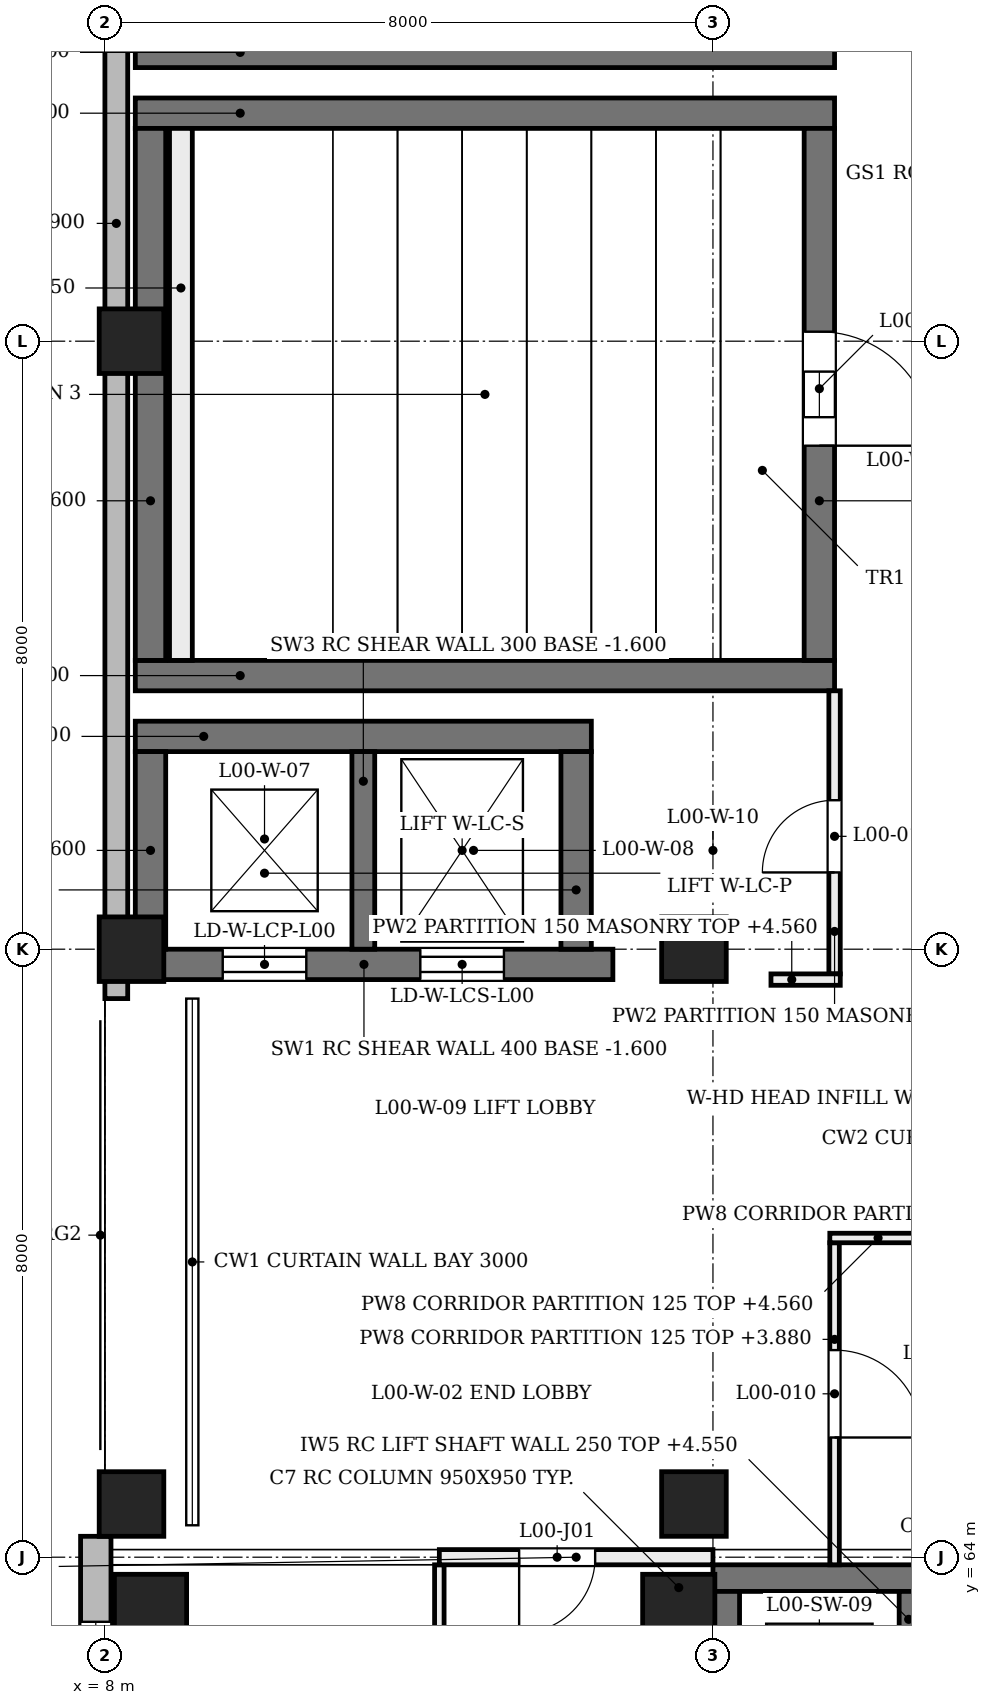
"""IFC4 building model, lengths in metres.
Left out: names, types, materials, properties, quantities, classifications, styles, units other than length and angle.
Written with IfcOpenShell. Run it as: python <this file> out.ifc"""

import sys

from ifc_helpers import new_model, si_unit, direction, frame, frame_2d, origin, origin_2d, place, context, subcontext, project, spatial, rectangle, extrude, element, fill, save


model = new_model("IFC4")
c1 = context("Model", 3, precision=1e-05, world=origin(), true_north=direction((0.0, 1.0)))
c2 = subcontext(c1, "Body", "Model", "MODEL_VIEW")
j1 = project(units=[si_unit("LENGTHUNIT", "METRE"), si_unit("PLANEANGLEUNIT", "RADIAN")], contexts=[c1])
p1 = place(None, origin())
s1 = spatial("IfcSite", under=j1, at=p1, CompositionType="ELEMENT")
p2 = place(p1, origin())
s2 = spatial("IfcBuilding", under=s1, at=p2, CompositionType="ELEMENT")
p3 = place(p2, origin())
s3 = spatial("IfcBuildingStorey", under=s2, at=p3, CompositionType="ELEMENT", Elevation=0.0)
for number, where, z_axis, x_axis in (
    (1, (8.4, 75.6, -1.6), (0.0, 0.0, 1.0), (1.0, 0.0, 0.0)),
    (2, (8.4, 83.0, -1.6), (0.0, 0.0, 1.0), (1.0, 0.0, 0.0)),
):
    element("IfcWall", number, at=place(p3, frame(where, z_axis=z_axis, x_axis=x_axis)), inside=s3, PredefinedType="SHEAR", context=c2, shape_type="SweptSolid", body=[
        extrude(rectangle(XDim=9.2, YDim=0.4, at=frame_2d((4.6, 0.0))), origin(), (0.0, 0.0, 1.0), 6.18),
    ])
p4 = place(p3, frame((8.6, 75.8, -1.6), z_axis=(0.0, 0.0, 1.0), x_axis=(0.0, 1.0, 0.0)))
e3 = element("IfcWall", 3, at=p4, inside=s3, PredefinedType="SHEAR", context=c2, shape_type="SweptSolid", body=[
    extrude(rectangle(XDim=7.0, YDim=0.4, at=frame_2d((3.5, 0.0))), origin(), (0.0, 0.0, 1.0), 6.18),
])
p5 = place(p3, frame((17.4, 75.8, -1.6), z_axis=(0.0, 0.0, 1.0), x_axis=(0.0, 1.0, 0.0)))
e4 = element("IfcWall", 4, at=p5, inside=s3, PredefinedType="SHEAR", context=c2, shape_type="SweptSolid", body=[
    extrude(rectangle(XDim=7.0, YDim=0.4, at=frame_2d((3.5, 0.0))), origin(), (0.0, 0.0, 1.0), 6.18),
])
p6 = place(p5, frame((2.825, 0.0, 1.6)))
e5 = element("IfcOpeningElement", 5, at=p6, cuts=e4, PredefinedType="OPENING", context=c2, shape_type="SweptSolid", body=[
    extrude(rectangle(XDim=1.5, YDim=2.1, at=frame_2d((0.75, 1.05))), frame((0.0, 0.21, 0.0), z_axis=(0.0, -1.0, 0.0), x_axis=(1.0, 0.0, 0.0)), (0.0, 0.0, 1.0), 0.42),
])
p7 = place(p5, frame((3.2, 0.0, 5.32)))
e6 = element("IfcOpeningElement", 6, at=p7, cuts=e4, PredefinedType="OPENING", context=c2, shape_type="SweptSolid", body=[
    extrude(rectangle(XDim=0.6, YDim=0.5, at=frame_2d((0.3, 0.25))), frame((0.0, 0.21, 0.0), z_axis=(0.0, -1.0, 0.0), x_axis=(1.0, 0.0, 0.0)), (0.0, 0.0, 1.0), 0.42),
])
p8 = place(p3, frame((8.4, 83.8, -1.6), z_axis=(0.0, 0.0, 1.0), x_axis=(1.0, 0.0, 0.0)))
e7 = element("IfcWall", 7, at=p8, inside=s3, PredefinedType="SHEAR", context=c2, shape_type="SweptSolid", body=[
    extrude(rectangle(XDim=9.2, YDim=0.4, at=frame_2d((4.6, 0.0))), origin(), (0.0, 0.0, 1.0), 6.18),
])
p9 = place(p3, frame((8.133, 71.8, -1.6), z_axis=(0.0, 0.0, 1.0), x_axis=(1.0, 0.0, 0.0)))
e8 = element("IfcWall", 8, at=p9, inside=s3, PredefinedType="SHEAR", context=c2, shape_type="SweptSolid", body=[
    extrude(rectangle(XDim=6.55, YDim=0.4, at=frame_2d((3.275, 0.0))), origin(), (0.0, 0.0, 1.0), 6.18),
])
p10 = place(p9, frame((1.417, 0.0, 1.6)))
e9 = element("IfcOpeningElement", 9, at=p10, cuts=e8, PredefinedType="OPENING", context=c2, shape_type="SweptSolid", body=[
    extrude(rectangle(XDim=1.1, YDim=2.1, at=frame_2d((0.55, 1.05))), frame((0.0, 0.21, 0.0), z_axis=(0.0, -1.0, 0.0), x_axis=(1.0, 0.0, 0.0)), (0.0, 0.0, 1.0), 0.42),
])
p11 = place(p9, frame((4.017, 0.0, 1.6)))
e10 = element("IfcOpeningElement", 10, at=p11, cuts=e8, PredefinedType="OPENING", context=c2, shape_type="SweptSolid", body=[
    extrude(rectangle(XDim=1.1, YDim=2.1, at=frame_2d((0.55, 1.05))), frame((0.0, 0.21, 0.0), z_axis=(0.0, -1.0, 0.0), x_axis=(1.0, 0.0, 0.0)), (0.0, 0.0, 1.0), 0.42),
])
p12 = place(p3, frame((8.4, 74.8, -1.6), z_axis=(0.0, 0.0, 1.0), x_axis=(1.0, 0.0, 0.0)))
e11 = element("IfcWall", 11, at=p12, inside=s3, PredefinedType="SHEAR", context=c2, shape_type="SweptSolid", body=[
    extrude(rectangle(XDim=6.0, YDim=0.4, at=frame_2d((3.0, 0.0))), origin(), (0.0, 0.0, 1.0), 6.18),
])
for number, where, z_axis, x_axis in (
    (12, (8.6, 72.0, -1.6), (0.0, 0.0, 1.0), (0.0, 1.0, 0.0)),
    (13, (14.2, 72.0, -1.6), (0.0, 0.0, 1.0), (0.0, 1.0, 0.0)),
):
    element("IfcWall", number, at=place(p3, frame(where, z_axis=z_axis, x_axis=x_axis)), inside=s3, PredefinedType="SHEAR", context=c2, shape_type="SweptSolid", body=[
        extrude(rectangle(XDim=2.6, YDim=0.4, at=frame_2d((1.3, 0.0))), origin(), (0.0, 0.0, 1.0), 6.18),
    ])
p13 = place(p3, frame((11.4, 72.0, -1.6), z_axis=(0.0, 0.0, 1.0), x_axis=(0.0, 1.0, 0.0)))
e14 = element("IfcWall", 14, at=p13, inside=s3, PredefinedType="SHEAR", context=c2, shape_type="SweptSolid", body=[
    extrude(rectangle(XDim=2.6, YDim=0.3, at=frame_2d((1.3, 0.0))), origin(), (0.0, 0.0, 1.0), 6.18),
])
p14 = place(p3, frame((16.0, 63.725, 0.0), z_axis=(0.0, 0.0, 1.0), x_axis=(1.0, 0.0, 0.0)))
e15 = element("IfcWall", 15, at=p14, inside=s3, PredefinedType="SHEAR", context=c2, shape_type="SweptSolid", body=[
    extrude(rectangle(XDim=8.275, YDim=0.35, at=frame_2d((4.137, 0.0))), origin(), (0.0, 0.0, 1.0), 4.58),
])
p15 = place(p3, frame((16.175, 48.35, 0.0), z_axis=(0.0, 0.0, 1.0), x_axis=(0.0, 1.0, 0.0)))
e16 = element("IfcWall", 16, at=p15, inside=s3, PredefinedType="SHEAR", context=c2, shape_type="SweptSolid", body=[
    extrude(rectangle(XDim=15.2, YDim=0.35, at=frame_2d((7.6, 0.0))), origin(), (0.0, 0.0, 1.0), 4.58),
])
p16 = place(p15, frame((0.95, 0.0, 0.0)))
e17 = element("IfcOpeningElement", 17, at=p16, cuts=e16, PredefinedType="OPENING", context=c2, shape_type="SweptSolid", body=[
    extrude(rectangle(XDim=1.0, YDim=2.1, at=frame_2d((0.5, 1.05))), frame((0.0, 0.185, 0.0), z_axis=(0.0, -1.0, 0.0), x_axis=(1.0, 0.0, 0.0)), (0.0, 0.0, 1.0), 0.37),
])
p17 = place(p15, frame((10.6, 0.0, 0.0)))
e18 = element("IfcOpeningElement", 18, at=p17, cuts=e16, PredefinedType="OPENING", context=c2, shape_type="SweptSolid", body=[
    extrude(rectangle(XDim=1.4, YDim=2.1, at=frame_2d((0.7, 1.05))), frame((0.0, 0.185, 0.0), z_axis=(0.0, -1.0, 0.0), x_axis=(1.0, 0.0, 0.0)), (0.0, 0.0, 1.0), 0.37),
])
for number, where, z_axis, x_axis in (
    (19, (8.6, 63.3, 0.0), (0.0, 0.0, 1.0), (1.0, 0.0, 0.0)),
    (20, (15.55, 63.3, 0.0), (0.0, 0.0, 1.0), (1.0, 0.0, 0.0)),
):
    element("IfcColumn", number, at=place(p3, frame(where, z_axis=z_axis, x_axis=x_axis)), inside=s3, PredefinedType="COLUMN", context=c2, shape_type="SweptSolid", body=[
        extrude(rectangle(XDim=0.95, YDim=0.95, at=origin_2d()), origin(), (0.0, 0.0, 1.0), 4.8),
    ])
for number, where, z_axis, x_axis in (
    (21, (8.933, 64.7, -1.6), (-0.204, 0.0, 0.979), (0.0, -1.0, 0.0)),
    (22, (8.933, 72.0, -1.6), (-0.204, 0.0, 0.979), (0.0, -1.0, 0.0)),
    (23, (8.933, 80.0, -1.6), (-0.204, 0.0, 0.979), (0.0, -1.0, 0.0)),
    (24, (16.333, 64.7, -1.6), (-0.204, 0.0, 0.979), (0.0, -1.0, 0.0)),
    (25, (16.333, 72.0, -1.6), (-0.204, 0.0, 0.979), (0.0, -1.0, 0.0)),
):
    element("IfcColumn", number, at=place(p3, frame(where, z_axis=z_axis, x_axis=x_axis)), inside=s3, PredefinedType="COLUMN", context=c2, shape_type="SweptSolid", body=[
        extrude(rectangle(XDim=0.85, YDim=0.85, at=origin_2d()), origin(), (0.0, 0.0, 1.0), 6.538),
    ])
p18 = place(p3, frame((8.15, 71.35, 0.0), z_axis=(0.0, 0.0, 1.0), x_axis=(0.0, 1.0, 0.0)))
e26 = element("IfcWall", 26, at=p18, inside=s3, PredefinedType="SOLIDWALL", context=c2, shape_type="SweptSolid", body=[
    extrude(rectangle(XDim=20.7, YDim=0.3, at=frame_2d((10.35, 0.0))), origin(), (0.0, 0.0, 1.0), 3.9),
])
p19 = place(p3, frame((7.88, 47.7, 0.0), z_axis=(0.0, 0.0, 1.0), x_axis=(0.0, 1.0, 0.0)))
e27 = element("IfcWall", 27, at=p19, inside=s3, PredefinedType="SOLIDWALL", context=c2, shape_type="SweptSolid", body=[
    extrude(rectangle(XDim=16.575, YDim=0.4, at=frame_2d((8.288, 0.0))), origin(), (0.0, 0.0, 1.0), 3.9),
])
p20 = place(p19, frame((0.75, 0.0, 1.9)))
e28 = element("IfcOpeningElement", 28, at=p20, cuts=e27, PredefinedType="OPENING", context=c2, shape_type="SweptSolid", body=[
    extrude(rectangle(XDim=1.2, YDim=1.5, at=frame_2d((0.6, 0.75))), frame((0.0, 0.21, 0.0), z_axis=(0.0, -1.0, 0.0), x_axis=(1.0, 0.0, 0.0)), (0.0, 0.0, 1.0), 0.42),
])
p21 = place(p19, frame((3.45, 0.0, 1.9)))
e29 = element("IfcOpeningElement", 29, at=p21, cuts=e27, PredefinedType="OPENING", context=c2, shape_type="SweptSolid", body=[
    extrude(rectangle(XDim=1.2, YDim=1.5, at=frame_2d((0.6, 0.75))), frame((0.0, 0.21, 0.0), z_axis=(0.0, -1.0, 0.0), x_axis=(1.0, 0.0, 0.0)), (0.0, 0.0, 1.0), 0.42),
])
p22 = place(p19, frame((6.15, 0.0, 1.9)))
e30 = element("IfcOpeningElement", 30, at=p22, cuts=e27, PredefinedType="OPENING", context=c2, shape_type="SweptSolid", body=[
    extrude(rectangle(XDim=1.2, YDim=1.5, at=frame_2d((0.6, 0.75))), frame((0.0, 0.21, 0.0), z_axis=(0.0, -1.0, 0.0), x_axis=(1.0, 0.0, 0.0)), (0.0, 0.0, 1.0), 0.42),
])
p23 = place(p19, frame((8.85, 0.0, 1.9)))
e31 = element("IfcOpeningElement", 31, at=p23, cuts=e27, PredefinedType="OPENING", context=c2, shape_type="SweptSolid", body=[
    extrude(rectangle(XDim=1.2, YDim=1.5, at=frame_2d((0.6, 0.75))), frame((0.0, 0.21, 0.0), z_axis=(0.0, -1.0, 0.0), x_axis=(1.0, 0.0, 0.0)), (0.0, 0.0, 1.0), 0.42),
])
p24 = place(p19, frame((11.55, 0.0, 1.9)))
e32 = element("IfcOpeningElement", 32, at=p24, cuts=e27, PredefinedType="OPENING", context=c2, shape_type="SweptSolid", body=[
    extrude(rectangle(XDim=1.2, YDim=1.5, at=frame_2d((0.6, 0.75))), frame((0.0, 0.21, 0.0), z_axis=(0.0, -1.0, 0.0), x_axis=(1.0, 0.0, 0.0)), (0.0, 0.0, 1.0), 0.42),
])
p25 = place(p19, frame((14.25, 0.0, 1.9)))
e33 = element("IfcOpeningElement", 33, at=p25, cuts=e27, PredefinedType="OPENING", context=c2, shape_type="SweptSolid", body=[
    extrude(rectangle(XDim=1.2, YDim=1.5, at=frame_2d((0.6, 0.75))), frame((0.0, 0.21, 0.0), z_axis=(0.0, -1.0, 0.0), x_axis=(1.0, 0.0, 0.0)), (0.0, 0.0, 1.0), 0.42),
])
p26 = place(p3, frame((18.575, 61.1, 0.0), z_axis=(0.0, 0.0, 1.0), x_axis=(0.0, 1.0, 0.0)))
e34 = element("IfcWall", 34, at=p26, inside=s3, PredefinedType="SOLIDWALL", context=c2, shape_type="SweptSolid", body=[
    extrude(rectangle(XDim=2.45, YDim=0.25, at=frame_2d((1.225, 0.0))), origin(), (0.0, 0.0, 1.0), 4.55),
])
p27 = place(p3, frame((17.6, 63.9, 0.0), z_axis=(0.0, 0.0, 1.0), x_axis=(0.0, 1.0, 0.0)))
e35 = element("IfcWall", 35, at=p27, inside=s3, PredefinedType="PARTITIONING", context=c2, shape_type="SweptSolid", body=[
    extrude(rectangle(XDim=4.238, YDim=0.125, at=frame_2d((2.119, 0.0))), origin(), (0.0, 0.0, 1.0), 3.88),
])
p28 = place(p27, frame((1.675, 0.0, 0.0)))
e36 = element("IfcOpeningElement", 36, at=p28, cuts=e35, PredefinedType="OPENING", context=c2, shape_type="SweptSolid", body=[
    extrude(rectangle(XDim=1.15, YDim=2.1, at=frame_2d((0.575, 1.05))), frame((0.0, 0.073, 0.0), z_axis=(0.0, -1.0, 0.0), x_axis=(1.0, 0.0, 0.0)), (0.0, 0.0, 1.0), 0.145),
])
p29 = place(p3, frame((17.6, 71.675, 0.0), z_axis=(0.0, 0.0, 1.0), x_axis=(0.0, 1.0, 0.0)))
e37 = element("IfcWall", 37, at=p29, inside=s3, PredefinedType="PARTITIONING", context=c2, shape_type="SweptSolid", body=[
    extrude(rectangle(XDim=3.725, YDim=0.15, at=frame_2d((1.862, 0.0))), origin(), (0.0, 0.0, 1.0), 3.98),
])
p30 = place(p29, frame((1.335, 0.0, 0.0)))
e38 = element("IfcOpeningElement", 38, at=p30, cuts=e37, PredefinedType="OPENING", context=c2, shape_type="SweptSolid", body=[
    extrude(rectangle(XDim=0.95, YDim=2.1, at=frame_2d((0.475, 1.05))), frame((0.0, 0.085, 0.0), z_axis=(0.0, -1.0, 0.0), x_axis=(1.0, 0.0, 0.0)), (0.0, 0.0, 1.0), 0.17),
])
p31 = place(p3, frame((17.538, 68.2, 0.0), z_axis=(0.0, 0.0, 1.0), x_axis=(1.0, 0.0, 0.0)))
e39 = element("IfcWall", 39, at=p31, inside=s3, PredefinedType="PARTITIONING", context=c2, shape_type="SweptSolid", body=[
    extrude(rectangle(XDim=4.232, YDim=0.125, at=frame_2d((2.116, 0.0))), origin(), (0.0, 0.0, 1.0), 4.56),
])
p32 = place(p3, frame((16.763, 71.6, 0.0), z_axis=(0.0, 0.0, 1.0), x_axis=(1.0, 0.0, 0.0)))
e40 = element("IfcWall", 40, at=p32, inside=s3, PredefinedType="PARTITIONING", context=c2, shape_type="SweptSolid", body=[
    extrude(rectangle(XDim=0.912, YDim=0.15, at=frame_2d((0.456, 0.0))), origin(), (0.0, 0.0, 1.0), 4.56),
])
p33 = place(p3, frame((12.4, 59.271, 0.0), z_axis=(0.0, 0.0, 1.0), x_axis=(0.0, 1.0, 0.0)))
e41 = element("IfcWall", 41, at=p33, inside=s3, PredefinedType="PARTITIONING", context=c2, shape_type="SweptSolid", body=[
    extrude(rectangle(XDim=4.629, YDim=0.125, at=frame_2d((2.314, 0.0))), origin(), (0.0, 0.0, 1.0), 3.88),
])
p34 = place(p33, frame((2.058, 0.0, 0.0)))
e42 = element("IfcOpeningElement", 42, at=p34, cuts=e41, PredefinedType="OPENING", context=c2, shape_type="SweptSolid", body=[
    extrude(rectangle(XDim=1.0, YDim=2.1, at=frame_2d((0.5, 1.05))), frame((0.0, 0.073, 0.0), z_axis=(0.0, -1.0, 0.0), x_axis=(1.0, 0.0, 0.0)), (0.0, 0.0, 1.0), 0.145),
])
p35 = place(p3, frame((12.4, 64.0, 0.0), z_axis=(0.0, 0.0, 1.0), x_axis=(1.0, 0.0, 0.0)))
e43 = element("IfcWall", 43, at=p35, inside=s3, PredefinedType="PARTITIONING", context=c2, shape_type="SweptSolid", body=[
    extrude(rectangle(XDim=3.6, YDim=0.2, at=frame_2d((1.8, 0.0))), origin(), (0.0, 0.0, 1.0), 3.88),
])
p36 = place(p35, frame((1.05, 0.0, 0.0)))
e44 = element("IfcOpeningElement", 44, at=p36, cuts=e43, PredefinedType="OPENING", context=c2, shape_type="SweptSolid", body=[
    extrude(rectangle(XDim=1.0, YDim=2.1, at=frame_2d((0.5, 1.05))), frame((0.0, 0.11, 0.0), z_axis=(0.0, -1.0, 0.0), x_axis=(1.0, 0.0, 0.0)), (0.0, 0.0, 1.0), 0.22),
])
p37 = place(p3, frame((9.0, 75.8, 0.0), z_axis=(0.0, 0.0, 1.0), x_axis=(0.0, 1.0, 0.0)))
e45 = element("IfcWall", 45, at=p37, inside=s3, PredefinedType="PARTITIONING", context=c2, shape_type="SweptSolid", body=[
    extrude(rectangle(XDim=7.0, YDim=0.3, at=frame_2d((3.5, 0.0))), origin(), (0.0, 0.0, 1.0), 6.95),
])
p38 = place(p25, origin())
e46 = element("IfcWindow", 46, at=p38, inside=s3, PartitioningType="SINGLE_PANEL", PredefinedType="WINDOW", context=c2, shape_type="SweptSolid", body=[
    extrude(rectangle(XDim=1.2, YDim=1.5, at=frame_2d((0.6, 0.75))), frame((0.0, 0.03, 0.0), z_axis=(0.0, -1.0, 0.0), x_axis=(1.0, 0.0, 0.0)), (0.0, 0.0, 1.0), 0.06),
])
fill(e33, e46)
p39 = place(p10, frame((1.1, 0.0, 0.0), z_axis=(0.0, 0.0, 1.0), x_axis=(-1.0, 0.0, 0.0)))
e47 = element("IfcDoor", 47, at=p39, inside=s3, OperationType="DOUBLE_DOOR_SLIDING", PredefinedType="DOOR", context=c2, shape_type="SweptSolid", body=[
    extrude(rectangle(XDim=1.1, YDim=2.1, at=frame_2d((0.55, 1.05))), frame((0.0, 0.025, 0.0), z_axis=(0.0, -1.0, 0.0), x_axis=(1.0, 0.0, 0.0)), (0.0, 0.0, 1.0), 0.05),
])
fill(e9, e47)
p40 = place(p11, frame((1.1, 0.0, 0.0), z_axis=(0.0, 0.0, 1.0), x_axis=(-1.0, 0.0, 0.0)))
e48 = element("IfcDoor", 48, at=p40, inside=s3, OperationType="DOUBLE_DOOR_SLIDING", PredefinedType="DOOR", context=c2, shape_type="SweptSolid", body=[
    extrude(rectangle(XDim=1.1, YDim=2.1, at=frame_2d((0.55, 1.05))), frame((0.0, 0.025, 0.0), z_axis=(0.0, -1.0, 0.0), x_axis=(1.0, 0.0, 0.0)), (0.0, 0.0, 1.0), 0.05),
])
fill(e10, e48)
p41 = place(p28, frame((1.15, 0.0, 0.0), z_axis=(0.0, 0.0, 1.0), x_axis=(-1.0, 0.0, 0.0)))
e49 = element("IfcDoor", 49, at=p41, inside=s3, OperationType="SINGLE_SWING_LEFT", PredefinedType="DOOR", context=c2, shape_type="SweptSolid", body=[
    extrude(rectangle(XDim=1.15, YDim=2.1, at=frame_2d((0.575, 1.05))), frame((0.0, 0.025, 0.0), z_axis=(0.0, -1.0, 0.0), x_axis=(1.0, 0.0, 0.0)), (0.0, 0.0, 1.0), 0.05),
])
fill(e36, e49)
p42 = place(p6, frame((1.5, 0.0, 0.0), z_axis=(0.0, 0.0, 1.0), x_axis=(-1.0, 0.0, 0.0)))
e50 = element("IfcDoor", 50, at=p42, inside=s3, OperationType="SINGLE_SWING_LEFT", PredefinedType="DOOR", context=c2, shape_type="SweptSolid", body=[
    extrude(rectangle(XDim=1.5, YDim=2.1, at=frame_2d((0.75, 1.05))), frame((0.0, 0.025, 0.0), z_axis=(0.0, -1.0, 0.0), x_axis=(1.0, 0.0, 0.0)), (0.0, 0.0, 1.0), 0.05),
])
fill(e5, e50)
p43 = place(p30, origin())
e51 = element("IfcDoor", 51, at=p43, inside=s3, OperationType="SINGLE_SWING_LEFT", PredefinedType="DOOR", context=c2, shape_type="SweptSolid", body=[
    extrude(rectangle(XDim=0.95, YDim=2.1, at=frame_2d((0.475, 1.05))), frame((0.0, 0.025, 0.0), z_axis=(0.0, -1.0, 0.0), x_axis=(1.0, 0.0, 0.0)), (0.0, 0.0, 1.0), 0.05),
])
fill(e38, e51)
p44 = place(p36, frame((1.0, 0.0, 0.0), z_axis=(0.0, 0.0, 1.0), x_axis=(-1.0, 0.0, 0.0)))
e52 = element("IfcDoor", 52, at=p44, inside=s3, OperationType="SINGLE_SWING_LEFT", PredefinedType="DOOR", context=c2, shape_type="SweptSolid", body=[
    extrude(rectangle(XDim=1.0, YDim=2.1, at=frame_2d((0.5, 1.05))), frame((0.0, 0.025, 0.0), z_axis=(0.0, -1.0, 0.0), x_axis=(1.0, 0.0, 0.0)), (0.0, 0.0, 1.0), 0.05),
])
fill(e44, e52)
p45 = place(p7, origin())
e53 = element("IfcWindow", 53, at=p45, inside=s3, PartitioningType="SINGLE_PANEL", PredefinedType="WINDOW", context=c2, shape_type="SweptSolid", body=[
    extrude(rectangle(XDim=0.6, YDim=0.5, at=frame_2d((0.3, 0.25))), frame((0.0, 0.03, 0.0), z_axis=(0.0, -1.0, 0.0), x_axis=(1.0, 0.0, 0.0)), (0.0, 0.0, 1.0), 0.06),
])
fill(e6, e53)
save(model, sys.argv[1])
